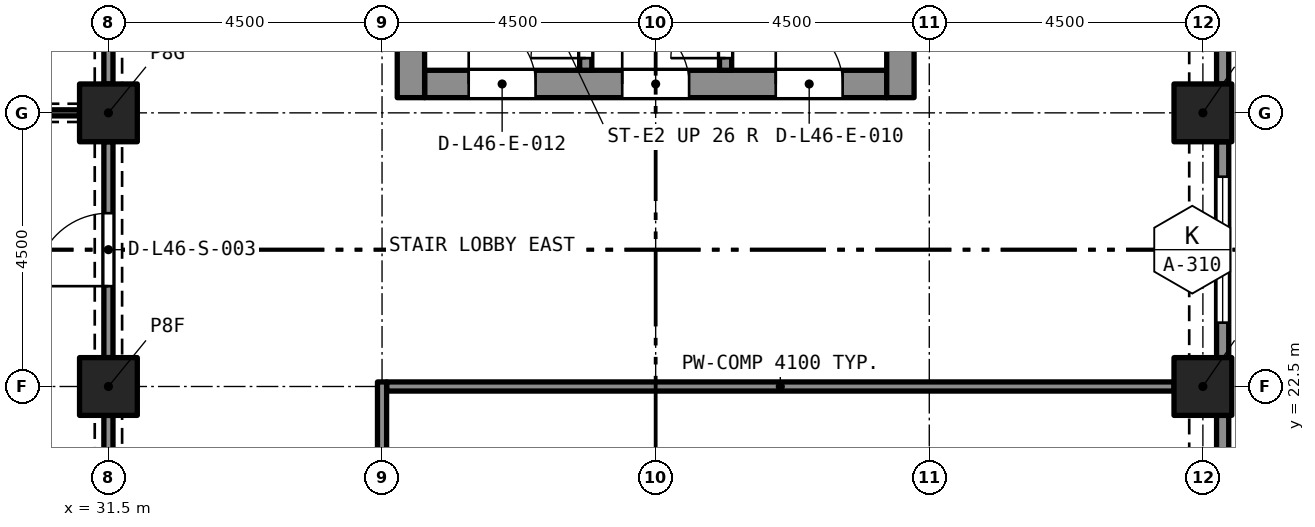
"""IFC4 building model, lengths in metres.
Left out: names, types, materials, properties, quantities, classifications, styles, units other than length and angle.
Written with IfcOpenShell. Run it as: python <this file> out.ifc"""

import sys

from ifc_helpers import new_model, si_unit, direction, frame, frame_2d, origin, origin_2d, place, context, subcontext, project, spatial, rectangle, extrude, element, fill, save


model = new_model("IFC4")
c1 = context("Model", 3, precision=1e-05, world=origin(), true_north=direction((0.0, 1.0)))
c2 = subcontext(c1, "Body", "Model", "MODEL_VIEW")
j1 = project(units=[si_unit("LENGTHUNIT", "METRE"), si_unit("PLANEANGLEUNIT", "RADIAN")], contexts=[c1])
p1 = place(None, origin())
s1 = spatial("IfcSite", under=j1, at=p1, CompositionType="ELEMENT")
p2 = place(p1, origin())
s2 = spatial("IfcBuilding", under=s1, at=p2, CompositionType="ELEMENT")
p3 = place(p2, frame((0.0, 0.0, 168.2)))
s3 = spatial("IfcBuildingStorey", under=s2, at=p3, CompositionType="ELEMENT", Elevation=168.2)
for number, where, z_axis, x_axis in (
    (1, (31.5, 22.5, 0.0), (0.0, 0.0, 1.0), (1.0, 0.0, 0.0)),
    (2, (49.5, 22.5, 0.0), (0.0, 0.0, 1.0), (1.0, 0.0, 0.0)),
    (3, (31.5, 27.0, 0.0), (0.0, 0.0, 1.0), (1.0, 0.0, 0.0)),
    (4, (49.5, 27.0, 0.0), (0.0, 0.0, 1.0), (1.0, 0.0, 0.0)),
):
    element("IfcColumn", number, at=place(p3, frame(where, z_axis=z_axis, x_axis=x_axis)), inside=s3, PredefinedType="COLUMN", context=c2, shape_type="SweptSolid", body=[
        extrude(rectangle(XDim=0.95, YDim=0.95, at=origin_2d()), origin(), (0.0, 0.0, 1.0), 4.4),
    ])
p4 = place(p3, frame((36.7, 27.475, 0.0), z_axis=(0.0, 0.0, 1.0), x_axis=(1.0, 0.0, 0.0)))
e5 = element("IfcWall", 5, at=p4, inside=s3, PredefinedType="SOLIDWALL", context=c2, shape_type="SweptSolid", body=[
    extrude(rectangle(XDim=7.6, YDim=0.45, at=frame_2d((3.8, 0.0))), origin(), (0.0, 0.0, 1.0), 4.4),
])
p5 = place(p4, frame((5.775, 0.0, 0.0)))
e6 = element("IfcOpeningElement", 6, at=p5, cuts=e5, PredefinedType="OPENING", context=c2, shape_type="SweptSolid", body=[
    extrude(rectangle(XDim=1.1, YDim=2.1, at=frame_2d((0.55, 1.05))), frame((0.0, 0.235, 0.0), z_axis=(0.0, -1.0, 0.0), x_axis=(1.0, 0.0, 0.0)), (0.0, 0.0, 1.0), 0.47),
])
p6 = place(p4, frame((3.25, 0.0, 0.0)))
e7 = element("IfcOpeningElement", 7, at=p6, cuts=e5, PredefinedType="OPENING", context=c2, shape_type="SweptSolid", body=[
    extrude(rectangle(XDim=1.1, YDim=2.1, at=frame_2d((0.55, 1.05))), frame((0.0, 0.235, 0.0), z_axis=(0.0, -1.0, 0.0), x_axis=(1.0, 0.0, 0.0)), (0.0, 0.0, 1.0), 0.47),
])
p7 = place(p4, frame((0.725, 0.0, 0.0)))
e8 = element("IfcOpeningElement", 8, at=p7, cuts=e5, PredefinedType="OPENING", context=c2, shape_type="SweptSolid", body=[
    extrude(rectangle(XDim=1.1, YDim=2.1, at=frame_2d((0.55, 1.05))), frame((0.0, 0.235, 0.0), z_axis=(0.0, -1.0, 0.0), x_axis=(1.0, 0.0, 0.0)), (0.0, 0.0, 1.0), 0.47),
])
p8 = place(p3, frame((36.475, 27.25, 0.0), z_axis=(0.0, 0.0, 1.0), x_axis=(0.0, 1.0, 0.0)))
e9 = element("IfcWall", 9, at=p8, inside=s3, PredefinedType="SOLIDWALL", context=c2, shape_type="SweptSolid", body=[
    extrude(rectangle(XDim=13.0, YDim=0.45, at=frame_2d((6.5, 0.0))), origin(), (0.0, 0.0, 1.0), 4.4),
])
p9 = place(p8, frame((8.7, 0.0, 0.0)))
e10 = element("IfcOpeningElement", 10, at=p9, cuts=e9, PredefinedType="OPENING", context=c2, shape_type="SweptSolid", body=[
    extrude(rectangle(XDim=1.2, YDim=2.1, at=frame_2d((0.6, 1.05))), frame((0.0, 0.235, 0.0), z_axis=(0.0, -1.0, 0.0), x_axis=(1.0, 0.0, 0.0)), (0.0, 0.0, 1.0), 0.47),
])
p10 = place(p3, frame((44.525, 27.25, 0.0), z_axis=(0.0, 0.0, 1.0), x_axis=(0.0, 1.0, 0.0)))
e11 = element("IfcWall", 11, at=p10, inside=s3, PredefinedType="SOLIDWALL", context=c2, shape_type="SweptSolid", body=[
    extrude(rectangle(XDim=13.0, YDim=0.45, at=frame_2d((6.5, 0.0))), origin(), (0.0, 0.0, 1.0), 4.4),
])
p11 = place(p10, frame((8.7, 0.0, 0.0)))
e12 = element("IfcOpeningElement", 12, at=p11, cuts=e11, PredefinedType="OPENING", context=c2, shape_type="SweptSolid", body=[
    extrude(rectangle(XDim=1.2, YDim=2.1, at=frame_2d((0.6, 1.05))), frame((0.0, 0.235, 0.0), z_axis=(0.0, -1.0, 0.0), x_axis=(1.0, 0.0, 0.0)), (0.0, 0.0, 1.0), 0.47),
])
p12 = place(p3, frame((49.825, 22.025, 0.0), z_axis=(0.0, 0.0, 1.0), x_axis=(0.0, -1.0, 0.0)))
e13 = element("IfcWall", 13, at=p12, inside=s3, PredefinedType="SOLIDWALL", context=c2, shape_type="SweptSolid", body=[
    extrude(rectangle(XDim=3.55, YDim=0.2, at=frame_2d((1.775, 0.0))), origin(), (0.0, 0.0, 1.0), 4.4),
])
p13 = place(p12, frame((0.575, 0.0, 0.45)))
e14 = element("IfcOpeningElement", 14, at=p13, cuts=e13, PredefinedType="OPENING", context=c2, shape_type="SweptSolid", body=[
    extrude(rectangle(XDim=2.4, YDim=2.55, at=frame_2d((1.2, 1.275))), frame((0.0, 0.11, 0.0), z_axis=(0.0, -1.0, 0.0), x_axis=(1.0, 0.0, 0.0)), (0.0, 0.0, 1.0), 0.22),
])
p14 = place(p3, frame((49.825, 26.525, 0.0), z_axis=(0.0, 0.0, 1.0), x_axis=(0.0, -1.0, 0.0)))
e15 = element("IfcWall", 15, at=p14, inside=s3, PredefinedType="SOLIDWALL", context=c2, shape_type="SweptSolid", body=[
    extrude(rectangle(XDim=3.55, YDim=0.2, at=frame_2d((1.775, 0.0))), origin(), (0.0, 0.0, 1.0), 4.4),
])
p15 = place(p14, frame((0.575, 0.0, 0.45)))
e16 = element("IfcOpeningElement", 16, at=p15, cuts=e15, PredefinedType="OPENING", context=c2, shape_type="SweptSolid", body=[
    extrude(rectangle(XDim=2.4, YDim=2.55, at=frame_2d((1.2, 1.275))), frame((0.0, 0.11, 0.0), z_axis=(0.0, -1.0, 0.0), x_axis=(1.0, 0.0, 0.0)), (0.0, 0.0, 1.0), 0.22),
])
p16 = place(p3, frame((49.825, 31.025, 0.0), z_axis=(0.0, 0.0, 1.0), x_axis=(0.0, -1.0, 0.0)))
e17 = element("IfcWall", 17, at=p16, inside=s3, PredefinedType="SOLIDWALL", context=c2, shape_type="SweptSolid", body=[
    extrude(rectangle(XDim=3.55, YDim=0.2, at=frame_2d((1.775, 0.0))), origin(), (0.0, 0.0, 1.0), 4.4),
])
p17 = place(p16, frame((0.575, 0.0, 0.45)))
e18 = element("IfcOpeningElement", 18, at=p17, cuts=e17, PredefinedType="OPENING", context=c2, shape_type="SweptSolid", body=[
    extrude(rectangle(XDim=2.4, YDim=2.55, at=frame_2d((1.2, 1.275))), frame((0.0, 0.11, 0.0), z_axis=(0.0, -1.0, 0.0), x_axis=(1.0, 0.0, 0.0)), (0.0, 0.0, 1.0), 0.22),
])
p18 = place(p3, frame((41.65, 27.7, 0.0), z_axis=(0.0, 0.0, 1.0), x_axis=(0.0, 1.0, 0.0)))
e19 = element("IfcWall", 19, at=p18, inside=s3, PredefinedType="SOLIDWALL", context=c2, shape_type="SweptSolid", body=[
    extrude(rectangle(XDim=5.4, YDim=0.2, at=frame_2d((2.7, 0.0))), origin(), (0.0, 0.0, 1.0), 4.1),
])
p19 = place(p18, frame((0.2, 0.0, 0.0)))
e20 = element("IfcOpeningElement", 20, at=p19, cuts=e19, PredefinedType="OPENING", context=c2, shape_type="SweptSolid", body=[
    extrude(rectangle(XDim=0.9, YDim=2.1, at=frame_2d((0.45, 1.05))), frame((0.0, 0.11, 0.0), z_axis=(0.0, -1.0, 0.0), x_axis=(1.0, 0.0, 0.0)), (0.0, 0.0, 1.0), 0.22),
])
p20 = place(p3, frame((39.35, 27.7, 0.0), z_axis=(0.0, 0.0, 1.0), x_axis=(0.0, 1.0, 0.0)))
e21 = element("IfcWall", 21, at=p20, inside=s3, PredefinedType="SOLIDWALL", context=c2, shape_type="SweptSolid", body=[
    extrude(rectangle(XDim=5.4, YDim=0.2, at=frame_2d((2.7, 0.0))), origin(), (0.0, 0.0, 1.0), 4.1),
])
p21 = place(p20, frame((0.2, 0.0, 0.0)))
e22 = element("IfcOpeningElement", 22, at=p21, cuts=e21, PredefinedType="OPENING", context=c2, shape_type="SweptSolid", body=[
    extrude(rectangle(XDim=0.9, YDim=2.1, at=frame_2d((0.45, 1.05))), frame((0.0, 0.11, 0.0), z_axis=(0.0, -1.0, 0.0), x_axis=(1.0, 0.0, 0.0)), (0.0, 0.0, 1.0), 0.22),
])
p22 = place(p3, frame((18.475, 27.0, 0.0), z_axis=(0.0, 0.0, 1.0), x_axis=(1.0, 0.0, 0.0)))
e23 = element("IfcWall", 23, at=p22, inside=s3, PredefinedType="PARTITIONING", context=c2, shape_type="SweptSolid", body=[
    extrude(rectangle(XDim=12.55, YDim=0.1, at=frame_2d((6.275, 0.0))), origin(), (0.0, 0.0, 1.0), 3.95),
])
p23 = place(p3, frame((31.5, 22.975, 0.0), z_axis=(0.0, 0.0, 1.0), x_axis=(0.0, 1.0, 0.0)))
e24 = element("IfcWall", 24, at=p23, inside=s3, PredefinedType="PARTITIONING", context=c2, shape_type="SweptSolid", body=[
    extrude(rectangle(XDim=3.55, YDim=0.15, at=frame_2d((1.775, 0.0))), origin(), (0.0, 0.0, 1.0), 3.58),
])
p24 = place(p23, frame((1.175, 0.0, 0.0)))
e25 = element("IfcOpeningElement", 25, at=p24, cuts=e24, PredefinedType="OPENING", context=c2, shape_type="SweptSolid", body=[
    extrude(rectangle(XDim=1.2, YDim=2.1, at=frame_2d((0.6, 1.05))), frame((0.0, 0.085, 0.0), z_axis=(0.0, -1.0, 0.0), x_axis=(1.0, 0.0, 0.0)), (0.0, 0.0, 1.0), 0.17),
])
for number, where, z_axis, x_axis in (
    (26, (31.5, 18.475, 0.0), (0.0, 0.0, 1.0), (0.0, 1.0, 0.0)),
    (27, (31.5, 27.475, 0.0), (0.0, 0.0, 1.0), (0.0, 1.0, 0.0)),
):
    element("IfcWall", number, at=place(p3, frame(where, z_axis=z_axis, x_axis=x_axis)), inside=s3, PredefinedType="PARTITIONING", context=c2, shape_type="SweptSolid", body=[
        extrude(rectangle(XDim=3.55, YDim=0.15, at=frame_2d((1.775, 0.0))), origin(), (0.0, 0.0, 1.0), 3.58),
    ])
p25 = place(p3, frame((36.075, 22.5, 0.0), z_axis=(0.0, 0.0, 1.0), x_axis=(1.0, 0.0, 0.0)))
e28 = element("IfcWall", 28, at=p25, inside=s3, PredefinedType="PARTITIONING", context=c2, shape_type="SweptSolid", body=[
    extrude(rectangle(XDim=12.95, YDim=0.15, at=frame_2d((6.475, 0.0))), origin(), (0.0, 0.0, 1.0), 4.1),
])
p26 = place(p3, frame((36.0, 22.575, 0.0), z_axis=(0.0, 0.0, 1.0), x_axis=(0.0, -1.0, 0.0)))
e29 = element("IfcWall", 29, at=p26, inside=s3, PredefinedType="PARTITIONING", context=c2, shape_type="SweptSolid", body=[
    extrude(rectangle(XDim=9.075, YDim=0.15, at=frame_2d((4.538, 0.0))), origin(), (0.0, 0.0, 1.0), 4.1),
])
p27 = place(p26, frame((4.075, 0.0, 0.0)))
e30 = element("IfcOpeningElement", 30, at=p27, cuts=e29, PredefinedType="OPENING", context=c2, shape_type="SweptSolid", body=[
    extrude(rectangle(XDim=1.0, YDim=2.1, at=frame_2d((0.5, 1.05))), frame((0.0, 0.085, 0.0), z_axis=(0.0, -1.0, 0.0), x_axis=(1.0, 0.0, 0.0)), (0.0, 0.0, 1.0), 0.17),
])
p28 = place(p15, origin())
e31 = element("IfcWindow", 31, at=p28, inside=s3, PartitioningType="SINGLE_PANEL", PredefinedType="WINDOW", context=c2, shape_type="SweptSolid", body=[
    extrude(rectangle(XDim=2.4, YDim=2.55, at=frame_2d((1.2, 1.275))), frame((0.0, 0.03, 0.0), z_axis=(0.0, -1.0, 0.0), x_axis=(1.0, 0.0, 0.0)), (0.0, 0.0, 1.0), 0.06),
])
fill(e16, e31)
p29 = place(p19, origin())
e32 = element("IfcDoor", 32, at=p29, inside=s3, OperationType="SINGLE_SWING_LEFT", PredefinedType="DOOR", context=c2, shape_type="SweptSolid", body=[
    extrude(rectangle(XDim=0.9, YDim=2.1, at=frame_2d((0.45, 1.05))), frame((0.0, 0.025, 0.0), z_axis=(0.0, -1.0, 0.0), x_axis=(1.0, 0.0, 0.0)), (0.0, 0.0, 1.0), 0.05),
])
fill(e20, e32)
p30 = place(p21, origin())
e33 = element("IfcDoor", 33, at=p30, inside=s3, OperationType="SINGLE_SWING_LEFT", PredefinedType="DOOR", context=c2, shape_type="SweptSolid", body=[
    extrude(rectangle(XDim=0.9, YDim=2.1, at=frame_2d((0.45, 1.05))), frame((0.0, 0.025, 0.0), z_axis=(0.0, -1.0, 0.0), x_axis=(1.0, 0.0, 0.0)), (0.0, 0.0, 1.0), 0.05),
])
fill(e22, e33)
p31 = place(p5, origin())
e34 = element("IfcDoor", 34, at=p31, inside=s3, OperationType="SINGLE_SWING_LEFT", PredefinedType="DOOR", context=c2, shape_type="SweptSolid", body=[
    extrude(rectangle(XDim=1.1, YDim=2.1, at=frame_2d((0.55, 1.05))), frame((0.0, 0.025, 0.0), z_axis=(0.0, -1.0, 0.0), x_axis=(1.0, 0.0, 0.0)), (0.0, 0.0, 1.0), 0.05),
])
fill(e6, e34)
p32 = place(p6, origin())
e35 = element("IfcDoor", 35, at=p32, inside=s3, OperationType="SINGLE_SWING_LEFT", PredefinedType="DOOR", context=c2, shape_type="SweptSolid", body=[
    extrude(rectangle(XDim=1.1, YDim=2.1, at=frame_2d((0.55, 1.05))), frame((0.0, 0.025, 0.0), z_axis=(0.0, -1.0, 0.0), x_axis=(1.0, 0.0, 0.0)), (0.0, 0.0, 1.0), 0.05),
])
fill(e7, e35)
p33 = place(p7, origin())
e36 = element("IfcDoor", 36, at=p33, inside=s3, OperationType="SINGLE_SWING_LEFT", PredefinedType="DOOR", context=c2, shape_type="SweptSolid", body=[
    extrude(rectangle(XDim=1.1, YDim=2.1, at=frame_2d((0.55, 1.05))), frame((0.0, 0.025, 0.0), z_axis=(0.0, -1.0, 0.0), x_axis=(1.0, 0.0, 0.0)), (0.0, 0.0, 1.0), 0.05),
])
fill(e8, e36)
p34 = place(p24, origin())
e37 = element("IfcDoor", 37, at=p34, inside=s3, OperationType="SINGLE_SWING_LEFT", PredefinedType="DOOR", context=c2, shape_type="SweptSolid", body=[
    extrude(rectangle(XDim=1.2, YDim=2.1, at=frame_2d((0.6, 1.05))), frame((0.0, 0.025, 0.0), z_axis=(0.0, -1.0, 0.0), x_axis=(1.0, 0.0, 0.0)), (0.0, 0.0, 1.0), 0.05),
])
fill(e25, e37)
save(model, sys.argv[1])
